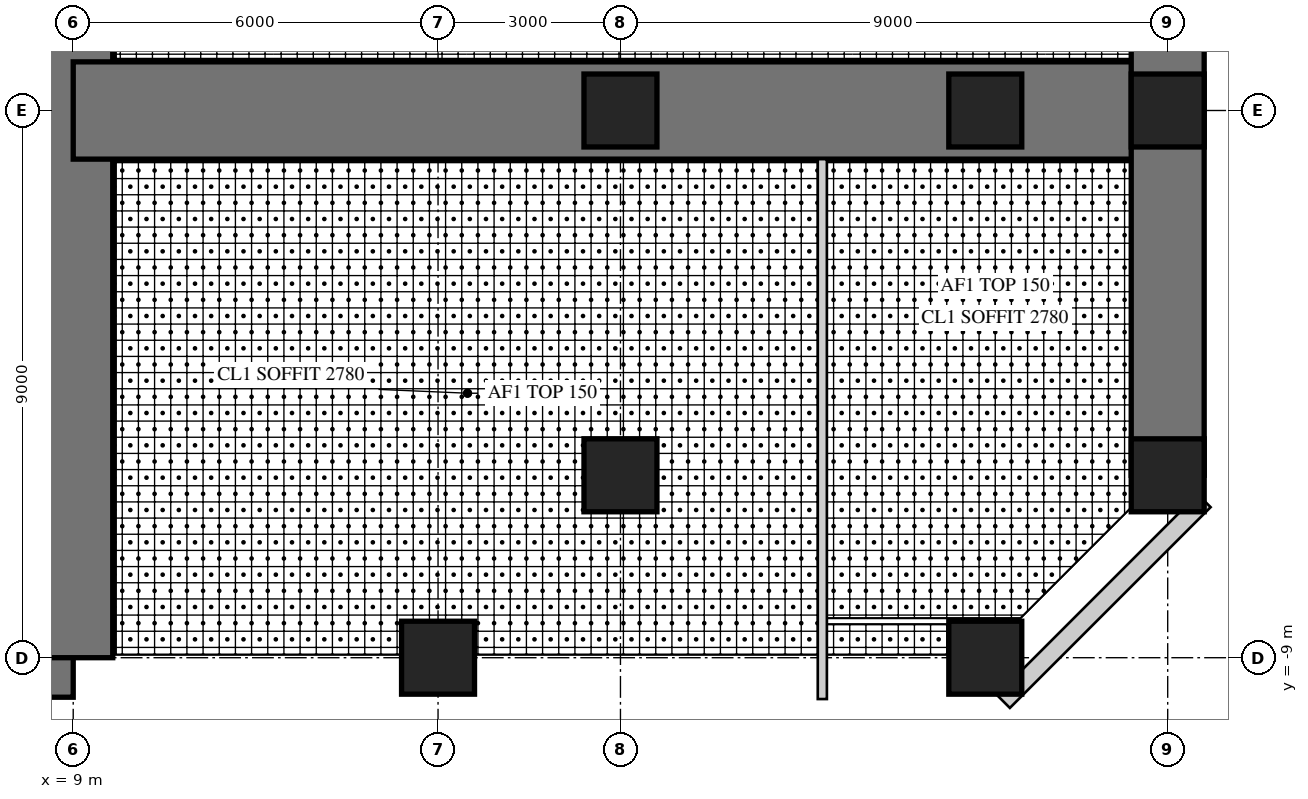
"""IFC4 building model, lengths in metres.
Left out: names, types, materials, properties, quantities, classifications, styles, units other than length and angle.
Written with IfcOpenShell. Run it as: python <this file> out.ifc"""

import sys

from ifc_helpers import new_model, si_unit, direction, frame, frame_2d, origin, origin_2d, place, context, subcontext, project, spatial, rectangle, hollow_rectangle, extrude, element, fill, save


model = new_model("IFC4")
c1 = context("Model", 3, precision=1e-05, world=origin(), true_north=direction((0.0, 1.0)))
c2 = subcontext(c1, "Body", "Model", "MODEL_VIEW")
j1 = project(units=[si_unit("LENGTHUNIT", "METRE"), si_unit("PLANEANGLEUNIT", "RADIAN")], contexts=[c1])
p1 = place(None, origin())
s1 = spatial("IfcSite", under=j1, at=p1, CompositionType="ELEMENT")
p2 = place(p1, origin())
s2 = spatial("IfcBuilding", under=s1, at=p2, CompositionType="ELEMENT")
p3 = place(p2, frame((0.0, 0.0, 35.5)))
s3 = spatial("IfcBuildingStorey", under=s2, at=p3, CompositionType="ELEMENT", Elevation=35.5)
p4 = place(p3, frame((-9.0, -9.0, 0.0), z_axis=(0.0, 0.0, 1.0), x_axis=(1.0, 0.0, 0.0)))
e1 = element("IfcWall", 1, at=p4, inside=s3, PredefinedType="SHEAR", context=c2, shape_type="SweptSolid", body=[
    extrude(rectangle(XDim=18.0, YDim=1.3, at=frame_2d((9.0, 0.0))), origin(), (0.0, 0.0, 1.0), 4.0),
])
p5 = place(p4, frame((9.8, 0.0, 0.0)))
e2 = element("IfcOpeningElement", 2, at=p5, cuts=e1, PredefinedType="OPENING", context=c2, shape_type="SweptSolid", body=[
    extrude(rectangle(XDim=1.0, YDim=2.4, at=frame_2d((0.5, 1.2))), frame((0.0, 0.66, 0.0), z_axis=(0.0, -1.0, 0.0), x_axis=(1.0, 0.0, 0.0)), (0.0, 0.0, 1.0), 1.32),
])
p6 = place(p3, frame((9.0, -9.0, 0.0), z_axis=(0.0, 0.0, 1.0), x_axis=(0.0, 1.0, 0.0)))
e3 = element("IfcWall", 3, at=p6, inside=s3, PredefinedType="SHEAR", context=c2, shape_type="SweptSolid", body=[
    extrude(rectangle(XDim=18.0, YDim=1.3, at=frame_2d((9.0, 0.0))), origin(), (0.0, 0.0, 1.0), 4.0),
])
p7 = place(p6, frame((9.8, 0.0, 0.0)))
e4 = element("IfcOpeningElement", 4, at=p7, cuts=e3, PredefinedType="OPENING", context=c2, shape_type="SweptSolid", body=[
    extrude(rectangle(XDim=1.0, YDim=2.4, at=frame_2d((0.5, 1.2))), frame((0.0, 0.66, 0.0), z_axis=(0.0, -1.0, 0.0), x_axis=(1.0, 0.0, 0.0)), (0.0, 0.0, 1.0), 1.32),
])
p8 = place(p3, frame((9.0, 0.0, 0.0), z_axis=(0.0, 0.0, 1.0), x_axis=(1.0, 0.0, 0.0)))
e5 = element("IfcWall", 5, at=p8, inside=s3, PredefinedType="SHEAR", context=c2, shape_type="SweptSolid", body=[
    extrude(rectangle(XDim=18.0, YDim=1.6, at=frame_2d((9.0, 0.0))), origin(), (0.0, 0.0, 1.0), 4.0),
])
p9 = place(p8, frame((9.9, 0.0, 0.0)))
e6 = element("IfcOpeningElement", 6, at=p9, cuts=e5, PredefinedType="OPENING", context=c2, shape_type="SweptSolid", body=[
    extrude(rectangle(XDim=1.0, YDim=2.2, at=frame_2d((0.5, 1.1))), frame((0.0, 0.81, 0.0), z_axis=(0.0, -1.0, 0.0), x_axis=(1.0, 0.0, 0.0)), (0.0, 0.0, 1.0), 1.62),
])
p10 = place(p3, frame((27.0, -6.0, 0.0), z_axis=(0.0, 0.0, 1.0), x_axis=(0.0, 1.0, 0.0)))
e7 = element("IfcWall", 7, at=p10, inside=s3, PredefinedType="SHEAR", context=c2, shape_type="SweptSolid", body=[
    extrude(rectangle(XDim=12.0, YDim=1.2, at=frame_2d((6.0, 0.0))), origin(), (0.0, 0.0, 1.0), 4.0),
])
p11 = place(p10, frame((1.5, 0.0, 0.6)))
e8 = element("IfcOpeningElement", 8, at=p11, cuts=e7, PredefinedType="OPENING", context=c2, shape_type="SweptSolid", body=[
    extrude(rectangle(XDim=3.0, YDim=2.4, at=frame_2d((1.5, 1.2))), frame((0.0, 0.61, 0.0), z_axis=(0.0, -1.0, 0.0), x_axis=(1.0, 0.0, 0.0)), (0.0, 0.0, 1.0), 1.22),
])
p12 = place(p10, frame((7.5, 0.0, 0.6)))
e9 = element("IfcOpeningElement", 9, at=p12, cuts=e7, PredefinedType="OPENING", context=c2, shape_type="SweptSolid", body=[
    extrude(rectangle(XDim=3.0, YDim=2.4, at=frame_2d((1.5, 1.2))), frame((0.0, 0.61, 0.0), z_axis=(0.0, -1.0, 0.0), x_axis=(1.0, 0.0, 0.0)), (0.0, 0.0, 1.0), 1.22),
])
for number, where, z_axis, x_axis in (
    (10, (15.0, -9.0, 0.0), (0.0, 0.0, 1.0), (1.0, 0.0, 0.0)),
    (11, (24.0, -9.0, 0.0), (0.0, 0.0, 1.0), (1.0, 0.0, 0.0)),
    (12, (27.0, -6.0, 0.0), (0.0, 0.0, 1.0), (1.0, 0.0, 0.0)),
    (13, (27.0, 0.0, 0.0), (0.0, 0.0, 1.0), (1.0, 0.0, 0.0)),
    (14, (18.0, -6.0, 0.0), (0.0, 0.0, 1.0), (1.0, 0.0, 0.0)),
    (15, (18.0, 0.0, 0.0), (0.0, 0.0, 1.0), (1.0, 0.0, 0.0)),
    (16, (24.0, 0.0, 0.0), (0.0, 0.0, 1.0), (1.0, 0.0, 0.0)),
):
    element("IfcColumn", number, at=place(p3, frame(where, z_axis=z_axis, x_axis=x_axis)), inside=s3, PredefinedType="COLUMN", context=c2, shape_type="SweptSolid", body=[
        extrude(rectangle(XDim=1.2, YDim=1.2, at=origin_2d()), origin(), (0.0, 0.0, 1.0), 4.0),
    ])
p13 = place(p3, frame((24.298, -9.72, 0.0), z_axis=(0.0, 0.0, 1.0), x_axis=(0.707106781187, 0.707106781187, 0.0)))
e17 = element("IfcWall", 17, at=p13, inside=s3, PredefinedType="SOLIDWALL", context=c2, shape_type="SweptSolid", body=[
    extrude(rectangle(XDim=4.669, YDim=0.3, at=frame_2d((2.335, 0.0))), origin(), (0.0, 0.0, 1.0), 3.8),
])
p14 = place(p13, frame((1.885, 0.0, 0.3)))
e18 = element("IfcOpeningElement", 18, at=p14, cuts=e17, PredefinedType="OPENING", context=c2, shape_type="SweptSolid", body=[
    extrude(rectangle(XDim=0.9, YDim=2.4, at=frame_2d((0.45, 1.2))), frame((0.0, 0.16, 0.0), z_axis=(0.0, -1.0, 0.0), x_axis=(1.0, 0.0, 0.0)), (0.0, 0.0, 1.0), 0.32),
])
p15 = place(p3, frame((21.32, -9.68, 0.0), z_axis=(0.0, 0.0, 1.0), x_axis=(0.0, 1.0, 0.0)))
e19 = element("IfcWall", 19, at=p15, inside=s3, PredefinedType="PARTITIONING", context=c2, shape_type="SweptSolid", body=[
    extrude(rectangle(XDim=8.88, YDim=0.15, at=frame_2d((4.44, 0.0))), origin(), (0.0, 0.0, 1.0), 3.8),
])
p16 = place(p15, frame((7.43, 0.0, 0.0)))
e20 = element("IfcOpeningElement", 20, at=p16, cuts=e19, PredefinedType="OPENING", context=c2, shape_type="SweptSolid", body=[
    extrude(rectangle(XDim=1.0, YDim=2.2, at=frame_2d((0.5, 1.1))), frame((0.0, 0.085, 0.0), z_axis=(0.0, -1.0, 0.0), x_axis=(1.0, 0.0, 0.0)), (0.0, 0.0, 1.0), 0.17),
])
p17 = place(p14, origin())
e21 = element("IfcWindow", 21, at=p17, inside=s3, PartitioningType="SINGLE_PANEL", PredefinedType="WINDOW", context=c2, shape_type="SweptSolid", body=[
    extrude(hollow_rectangle(XDim=0.9, YDim=2.4, WallThickness=0.06, at=frame_2d((0.45, 1.2))), frame((0.0, 0.03, 0.0), z_axis=(0.0, -1.0, 0.0), x_axis=(1.0, 0.0, 0.0)), (0.0, 0.0, 1.0), 0.06),
    extrude(rectangle(XDim=0.779, YDim=2.279, at=frame_2d((0.45, 1.2))), frame((0.0, 0.03, 0.0), z_axis=(0.0, -1.0, 0.0), x_axis=(1.0, 0.0, 0.0)), (0.0, 0.0, 1.0), 0.06),
])
fill(e18, e21)
p18 = place(p11, origin())
e22 = element("IfcWindow", 22, at=p18, inside=s3, PartitioningType="SINGLE_PANEL", PredefinedType="WINDOW", context=c2, shape_type="SweptSolid", body=[
    extrude(hollow_rectangle(XDim=3.0, YDim=2.4, WallThickness=0.06, at=frame_2d((1.5, 1.2))), frame((0.0, 0.03, 0.0), z_axis=(0.0, -1.0, 0.0), x_axis=(1.0, 0.0, 0.0)), (0.0, 0.0, 1.0), 0.06),
    extrude(rectangle(XDim=2.879, YDim=2.279, at=frame_2d((1.5, 1.2))), frame((0.0, 0.03, 0.0), z_axis=(0.0, -1.0, 0.0), x_axis=(1.0, 0.0, 0.0)), (0.0, 0.0, 1.0), 0.06),
])
fill(e8, e22)
p19 = place(p16, frame((1.0, 0.0, 0.0), z_axis=(0.0, 0.0, 1.0), x_axis=(-1.0, 0.0, 0.0)))
e23 = element("IfcDoor", 23, at=p19, inside=s3, OperationType="SINGLE_SWING_LEFT", PredefinedType="DOOR", context=c2, shape_type="SweptSolid", body=[
    extrude(rectangle(XDim=1.0, YDim=2.2, at=frame_2d((0.5, 1.1))), frame((0.0, 0.025, 0.0), z_axis=(0.0, -1.0, 0.0), x_axis=(1.0, 0.0, 0.0)), (0.0, 0.0, 1.0), 0.05),
])
fill(e20, e23)
p20 = place(p9, frame((1.0, 0.0, 0.0), z_axis=(0.0, 0.0, 1.0), x_axis=(-1.0, 0.0, 0.0)))
e24 = element("IfcDoor", 24, at=p20, inside=s3, OperationType="SINGLE_SWING_LEFT", PredefinedType="DOOR", context=c2, shape_type="SweptSolid", body=[
    extrude(rectangle(XDim=1.0, YDim=2.2, at=frame_2d((0.5, 1.1))), frame((0.0, 0.025, 0.0), z_axis=(0.0, -1.0, 0.0), x_axis=(1.0, 0.0, 0.0)), (0.0, 0.0, 1.0), 0.05),
])
fill(e6, e24)
p21 = place(p7, frame((1.0, 0.0, 0.0), z_axis=(0.0, 0.0, 1.0), x_axis=(-1.0, 0.0, 0.0)))
e25 = element("IfcDoor", 25, at=p21, inside=s3, OperationType="SINGLE_SWING_RIGHT", PredefinedType="DOOR", context=c2, shape_type="SweptSolid", body=[
    extrude(rectangle(XDim=1.0, YDim=2.4, at=frame_2d((0.5, 1.2))), frame((0.0, -0.005, 0.0), z_axis=(0.0, -1.0, 0.0), x_axis=(1.0, 0.0, 0.0)), (0.0, 0.0, 1.0), 0.05),
])
fill(e4, e25)
save(model, sys.argv[1])
